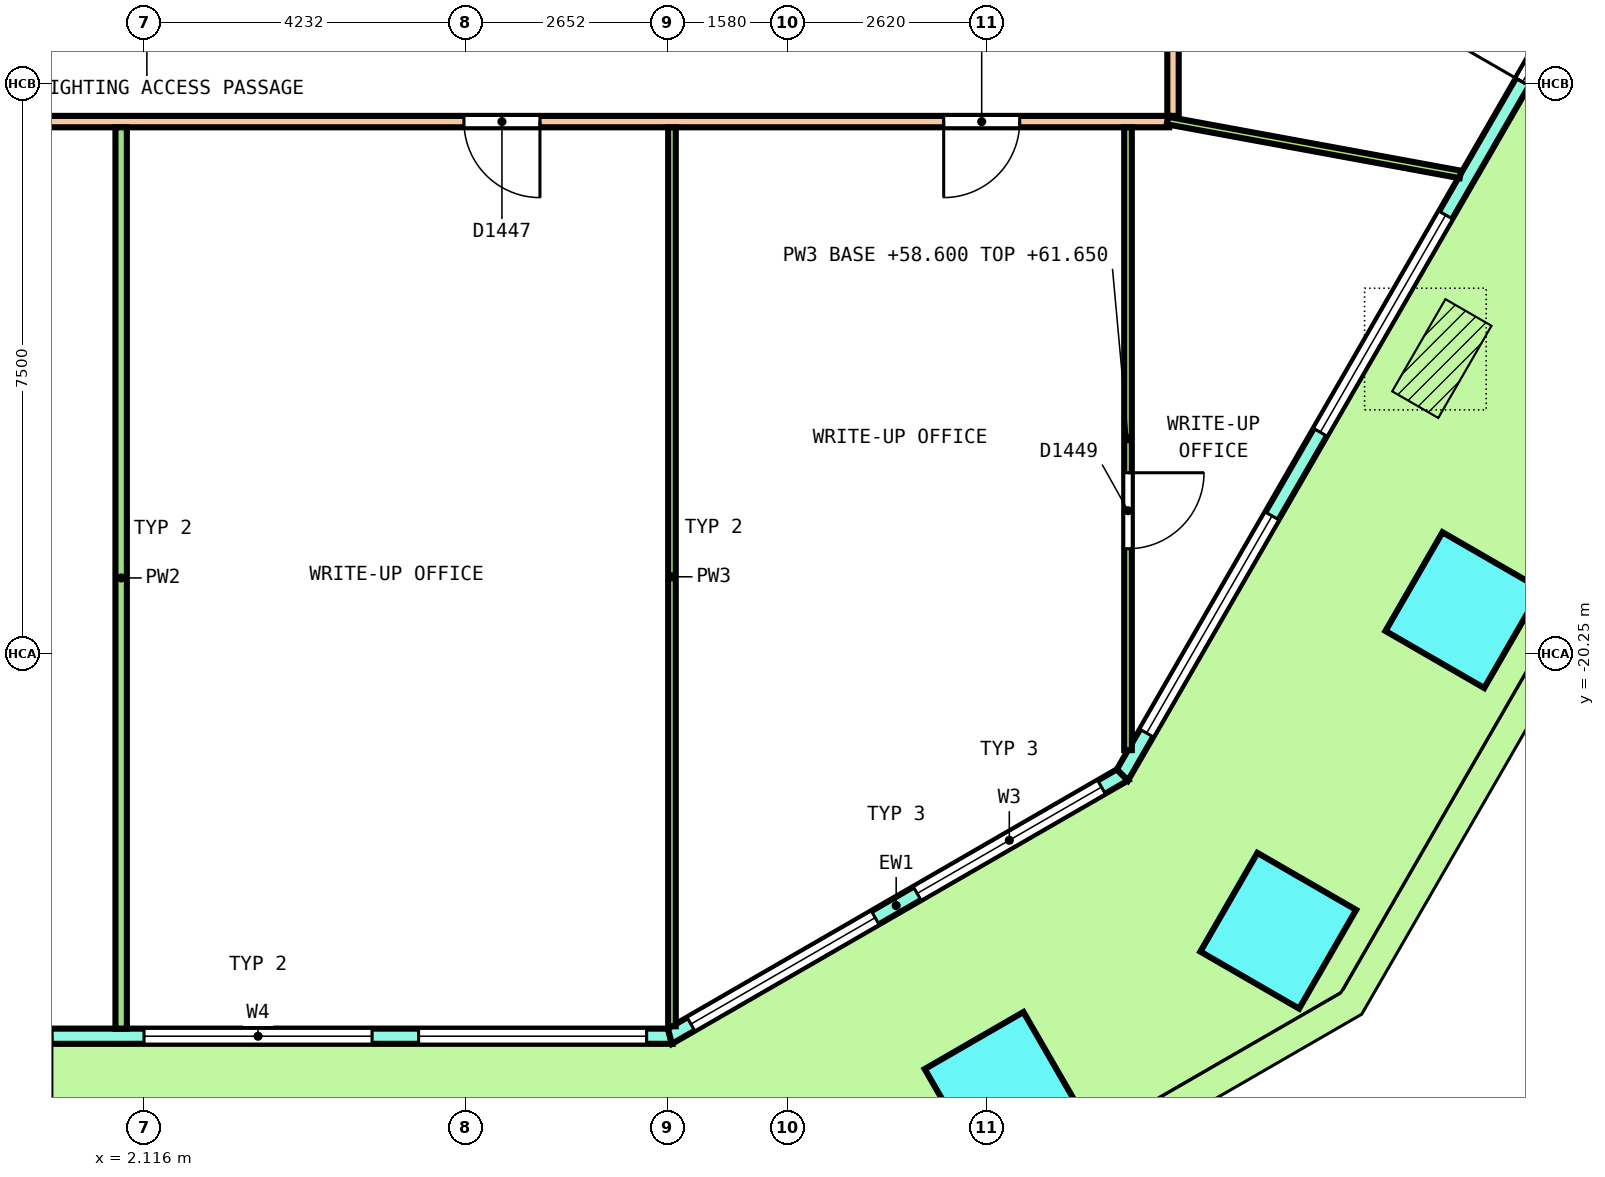
"""IFC4 building model, lengths in metres.
Left out: names, types, materials, properties, quantities, classifications, styles, units other than length and angle.
Written with IfcOpenShell. Run it as: python <this file> out.ifc"""

import sys

from ifc_helpers import new_model, si_unit, direction, frame, frame_2d, origin, origin_2d, place, context, subcontext, project, spatial, polyline, rectangle, outline, extrude, element, fill, save


model = new_model("IFC4")
c1 = context("Model", 3, precision=1e-05, world=origin(), true_north=direction((0.0, 1.0)))
c2 = subcontext(c1, "Body", "Model", "MODEL_VIEW")
j1 = project(units=[si_unit("LENGTHUNIT", "METRE"), si_unit("PLANEANGLEUNIT", "RADIAN")], contexts=[c1])
p1 = place(None, origin())
s1 = spatial("IfcSite", under=j1, at=p1, CompositionType="ELEMENT")
p2 = place(p1, origin())
s2 = spatial("IfcBuilding", under=s1, at=p2, CompositionType="ELEMENT")
p3 = place(p2, frame((0.0, 0.0, 58.6)))
s3 = spatial("IfcBuildingStorey", under=s2, at=p3, CompositionType="ELEMENT", Elevation=58.6)
for number, where, z_axis, x_axis in (
    (1, (13.408, -25.989, 0.0), (0.0, 0.0, 1.0), (0.866, 0.5, 0.0)),
    (2, (17.035, -23.895, 0.0), (0.0, 0.0, 1.0), (0.5, 0.866, 0.0)),
    (3, (19.47, -19.677, 0.0), (0.0, 0.0, 1.0), (0.5, 0.866, 0.0)),
):
    element("IfcColumn", number, at=place(p3, frame(where, z_axis=z_axis, x_axis=x_axis)), inside=s3, PredefinedType="COLUMN", context=c2, shape_type="SweptSolid", body=[
        extrude(rectangle(XDim=1.5, YDim=1.5, at=origin_2d()), origin(), (0.0, 0.0, 1.0), 4.05),
    ])
p4 = place(p3, frame((-9.031, -25.283, 0.0), z_axis=(0.0, 0.0, 1.0), x_axis=(1.0, 0.0, 0.0)))
e4 = element("IfcWall", 4, at=p4, inside=s3, PredefinedType="SOLIDWALL", context=c2, shape_type="SweptSolid", body=[
    extrude(outline(polyline([(-0.027, -0.1), (0.979, -0.1), (1.986, -0.1), (2.992, -0.1), (3.999, -0.1), (5.005, -0.1), (6.012, -0.1), (7.018, -0.1), (8.025, -0.1), (9.031, -0.1), (10.038, -0.1), (11.044, -0.1), (12.051, -0.1), (13.057, -0.1), (14.063, -0.1), (15.07, -0.1), (16.076, -0.1), (17.083, -0.1), (18.089, -0.1), (18.036, 0.1), (17.035, 0.1), (16.035, 0.1), (15.034, 0.1), (14.034, 0.1), (13.033, 0.1), (12.033, 0.1), (11.032, 0.1), (10.032, 0.1), (9.031, 0.1), (8.031, 0.1), (7.03, 0.1), (6.03, 0.1), (5.029, 0.1), (4.029, 0.1), (3.028, 0.1), (2.028, 0.1), (1.027, 0.1), (0.027, 0.1), (-0.027, -0.1)])), origin(), (0.0, 0.0, 1.0), 4.1),
])
p5 = place(p4, frame((0.306, 0.0, 0.1)))
e5 = element("IfcOpeningElement", 5, at=p5, cuts=e4, PredefinedType="OPENING", context=c2, shape_type="SweptSolid", body=[
    extrude(rectangle(XDim=3.0, YDim=2.9, at=frame_2d((1.5, 1.45))), frame((0.0, 0.11, 0.0), z_axis=(0.0, -1.0, 0.0), x_axis=(1.0, 0.0, 0.0)), (0.0, 0.0, 1.0), 0.22),
])
p6 = place(p4, frame((3.919, 0.0, 0.1)))
e6 = element("IfcOpeningElement", 6, at=p6, cuts=e4, PredefinedType="OPENING", context=c2, shape_type="SweptSolid", body=[
    extrude(rectangle(XDim=3.0, YDim=2.9, at=frame_2d((1.5, 1.45))), frame((0.0, 0.11, 0.0), z_axis=(0.0, -1.0, 0.0), x_axis=(1.0, 0.0, 0.0)), (0.0, 0.0, 1.0), 0.22),
])
p7 = place(p4, frame((8.131, 0.0, 0.0)))
e7 = element("IfcOpeningElement", 7, at=p7, cuts=e4, PredefinedType="OPENING", context=c2, shape_type="SweptSolid", body=[
    extrude(rectangle(XDim=1.8, YDim=2.4, at=frame_2d((0.9, 1.2))), frame((0.0, 0.11, 0.0), z_axis=(0.0, -1.0, 0.0), x_axis=(1.0, 0.0, 0.0)), (0.0, 0.0, 1.0), 0.22),
])
p8 = place(p4, frame((8.131, 0.0, 2.55)))
e8 = element("IfcOpeningElement", 8, at=p8, cuts=e4, PredefinedType="OPENING", context=c2, shape_type="SweptSolid", body=[
    extrude(rectangle(XDim=1.8, YDim=0.45, at=frame_2d((0.9, 0.225))), frame((0.0, 0.11, 0.0), z_axis=(0.0, -1.0, 0.0), x_axis=(1.0, 0.0, 0.0)), (0.0, 0.0, 1.0), 0.22),
])
p9 = place(p4, frame((11.144, 0.0, 0.1)))
e9 = element("IfcOpeningElement", 9, at=p9, cuts=e4, PredefinedType="OPENING", context=c2, shape_type="SweptSolid", body=[
    extrude(rectangle(XDim=3.0, YDim=2.9, at=frame_2d((1.5, 1.45))), frame((0.0, 0.11, 0.0), z_axis=(0.0, -1.0, 0.0), x_axis=(1.0, 0.0, 0.0)), (0.0, 0.0, 1.0), 0.22),
])
p10 = place(p4, frame((14.756, 0.0, 0.1)))
e10 = element("IfcOpeningElement", 10, at=p10, cuts=e4, PredefinedType="OPENING", context=c2, shape_type="SweptSolid", body=[
    extrude(rectangle(XDim=3.0, YDim=2.9, at=frame_2d((1.5, 1.45))), frame((0.0, 0.11, 0.0), z_axis=(0.0, -1.0, 0.0), x_axis=(1.0, 0.0, 0.0)), (0.0, 0.0, 1.0), 0.22),
])
p11 = place(p3, frame((9.031, -25.283, 0.0), z_axis=(0.0, 0.0, 1.0), x_axis=(0.866029458321, 0.49999297727, 0.0)))
e11 = element("IfcWall", 11, at=p11, inside=s3, PredefinedType="SOLIDWALL", context=c2, shape_type="SweptSolid", body=[
    extrude(outline(polyline([(-0.027, -0.1), (1.128, -0.1), (2.282, -0.1), (3.437, -0.1), (4.592, -0.1), (5.747, -0.1), (6.901, -0.1), (6.848, 0.1), (5.711, 0.1), (4.574, 0.1), (3.437, 0.1), (2.301, 0.1), (1.164, 0.1), (0.027, 0.1), (-0.027, -0.1)])), origin(), (0.0, 0.0, 1.0), 4.1),
])
p12 = place(p11, frame((0.319, 0.0, 0.1)))
e12 = element("IfcOpeningElement", 12, at=p12, cuts=e11, PredefinedType="OPENING", context=c2, shape_type="SweptSolid", body=[
    extrude(rectangle(XDim=2.8, YDim=2.9, at=frame_2d((1.4, 1.45))), frame((0.0, 0.11, 0.0), z_axis=(0.0, -1.0, 0.0), x_axis=(1.0, 0.0, 0.0)), (0.0, 0.0, 1.0), 0.22),
])
p13 = place(p11, frame((3.756, 0.0, 0.1)))
e13 = element("IfcOpeningElement", 13, at=p13, cuts=e11, PredefinedType="OPENING", context=c2, shape_type="SweptSolid", body=[
    extrude(rectangle(XDim=2.8, YDim=2.9, at=frame_2d((1.4, 1.45))), frame((0.0, 0.11, 0.0), z_axis=(0.0, -1.0, 0.0), x_axis=(1.0, 0.0, 0.0)), (0.0, 0.0, 1.0), 0.22),
])
p14 = place(p3, frame((14.985, -21.845, 0.0), z_axis=(0.0, 0.0, 1.0), x_axis=(0.50000204422, 0.86602422355, 0.0)))
e14 = element("IfcWall", 14, at=p14, inside=s3, PredefinedType="SOLIDWALL", context=c2, shape_type="SweptSolid", body=[
    extrude(outline(polyline([(-0.027, -0.1), (1.014, -0.1), (2.055, -0.1), (3.097, -0.1), (4.138, -0.1), (5.179, -0.1), (6.22, -0.1), (7.261, -0.1), (8.303, -0.1), (9.344, -0.1), (10.385, -0.1), (11.426, -0.1), (12.468, -0.1), (13.509, -0.1), (14.55, -0.1), (15.591, -0.1), (16.632, -0.1), (17.673, -0.1), (18.715, -0.1), (19.756, -0.1), (20.797, -0.1), (21.838, -0.1), (22.879, -0.1), (22.826, 0.1), (21.789, 0.1), (20.753, 0.1), (19.717, 0.1), (18.68, 0.1), (17.644, 0.1), (16.608, 0.1), (15.572, 0.1), (14.535, 0.1), (13.499, 0.1), (12.463, 0.1), (11.426, 0.1), (10.39, 0.1), (9.354, 0.1), (8.317, 0.1), (7.281, 0.1), (6.245, 0.1), (5.208, 0.1), (4.172, 0.1), (3.136, 0.1), (2.099, 0.1), (1.063, 0.1), (0.027, 0.1), (-0.027, -0.1)])), origin(), (0.0, 0.0, 1.0), 4.1),
])
p15 = place(p14, frame((0.635, 0.0, 0.1)))
e15 = element("IfcOpeningElement", 15, at=p15, cuts=e14, PredefinedType="OPENING", context=c2, shape_type="SweptSolid", body=[
    extrude(rectangle(XDim=3.3, YDim=2.9, at=frame_2d((1.65, 1.45))), frame((0.0, 0.11, 0.0), z_axis=(0.0, -1.0, 0.0), x_axis=(1.0, 0.0, 0.0)), (0.0, 0.0, 1.0), 0.22),
])
p16 = place(p14, frame((5.206, 0.0, 0.1)))
e16 = element("IfcOpeningElement", 16, at=p16, cuts=e14, PredefinedType="OPENING", context=c2, shape_type="SweptSolid", body=[
    extrude(rectangle(XDim=3.3, YDim=2.9, at=frame_2d((1.65, 1.45))), frame((0.0, 0.11, 0.0), z_axis=(0.0, -1.0, 0.0), x_axis=(1.0, 0.0, 0.0)), (0.0, 0.0, 1.0), 0.22),
])
p17 = place(p14, frame((10.526, 0.0, 0.0)))
e17 = element("IfcOpeningElement", 17, at=p17, cuts=e14, PredefinedType="OPENING", context=c2, shape_type="SweptSolid", body=[
    extrude(rectangle(XDim=1.8, YDim=2.4, at=frame_2d((0.9, 1.2))), frame((0.0, 0.11, 0.0), z_axis=(0.0, -1.0, 0.0), x_axis=(1.0, 0.0, 0.0)), (0.0, 0.0, 1.0), 0.22),
])
p18 = place(p14, frame((10.526, 0.0, 2.55)))
e18 = element("IfcOpeningElement", 18, at=p18, cuts=e14, PredefinedType="OPENING", context=c2, shape_type="SweptSolid", body=[
    extrude(rectangle(XDim=1.8, YDim=0.45, at=frame_2d((0.9, 0.225))), frame((0.0, 0.11, 0.0), z_axis=(0.0, -1.0, 0.0), x_axis=(1.0, 0.0, 0.0)), (0.0, 0.0, 1.0), 0.22),
])
p19 = place(p14, frame((14.347, 0.0, 0.1)))
e19 = element("IfcOpeningElement", 19, at=p19, cuts=e14, PredefinedType="OPENING", context=c2, shape_type="SweptSolid", body=[
    extrude(rectangle(XDim=3.3, YDim=2.9, at=frame_2d((1.65, 1.45))), frame((0.0, 0.11, 0.0), z_axis=(0.0, -1.0, 0.0), x_axis=(1.0, 0.0, 0.0)), (0.0, 0.0, 1.0), 0.22),
])
p20 = place(p14, frame((18.917, 0.0, 0.1)))
e20 = element("IfcOpeningElement", 20, at=p20, cuts=e14, PredefinedType="OPENING", context=c2, shape_type="SweptSolid", body=[
    extrude(rectangle(XDim=3.3, YDim=2.9, at=frame_2d((1.65, 1.45))), frame((0.0, 0.11, 0.0), z_axis=(0.0, -1.0, 0.0), x_axis=(1.0, 0.0, 0.0)), (0.0, 0.0, 1.0), 0.22),
])
p21 = place(p3, frame((15.65, -13.175, 0.0), z_axis=(0.0, 0.0, 1.0), x_axis=(0.0, 1.0, 0.0)))
e21 = element("IfcWall", 21, at=p21, inside=s3, PredefinedType="PARTITIONING", context=c2, shape_type="SweptSolid", body=[
    extrude(rectangle(XDim=26.35, YDim=0.15, at=frame_2d((13.175, 0.0))), origin(), (0.0, 0.0, 1.0), 3.05),
])
p22 = place(p21, frame((16.576, 0.0, 0.0)))
e22 = element("IfcOpeningElement", 22, at=p22, cuts=e21, PredefinedType="OPENING", context=c2, shape_type="SweptSolid", body=[
    extrude(rectangle(XDim=1.2, YDim=2.1, at=frame_2d((0.6, 1.05))), frame((0.0, 0.085, 0.0), z_axis=(0.0, -1.0, 0.0), x_axis=(1.0, 0.0, 0.0)), (0.0, 0.0, 1.0), 0.17),
])
p23 = place(p21, frame((22.401, 0.0, 0.0)))
e23 = element("IfcOpeningElement", 23, at=p23, cuts=e21, PredefinedType="OPENING", context=c2, shape_type="SweptSolid", body=[
    extrude(rectangle(XDim=1.0, YDim=2.1, at=frame_2d((0.5, 1.05))), frame((0.0, 0.085, 0.0), z_axis=(0.0, -1.0, 0.0), x_axis=(1.0, 0.0, 0.0)), (0.0, 0.0, 1.0), 0.17),
])
p24 = place(p21, frame((1.65, 0.0, 0.0)))
e24 = element("IfcOpeningElement", 24, at=p24, cuts=e21, PredefinedType="OPENING", context=c2, shape_type="SweptSolid", body=[
    extrude(rectangle(XDim=1.0, YDim=2.1, at=frame_2d((0.5, 1.05))), frame((0.0, 0.085, 0.0), z_axis=(0.0, -1.0, 0.0), x_axis=(1.0, 0.0, 0.0)), (0.0, 0.0, 1.0), 0.17),
])
p25 = place(p3, frame((-15.725, -13.25, 0.0), z_axis=(0.0, 0.0, 1.0), x_axis=(1.0, 0.0, 0.0)))
e25 = element("IfcWall", 25, at=p25, inside=s3, PredefinedType="PARTITIONING", context=c2, shape_type="SweptSolid", body=[
    extrude(rectangle(XDim=31.325, YDim=0.15, at=frame_2d((15.663, 0.0))), origin(), (0.0, 0.0, 1.0), 3.05),
])
p26 = place(p25, frame((0.898, 0.0, 0.0)))
e26 = element("IfcOpeningElement", 26, at=p26, cuts=e25, PredefinedType="OPENING", context=c2, shape_type="SweptSolid", body=[
    extrude(rectangle(XDim=1.0, YDim=2.1, at=frame_2d((0.5, 1.05))), frame((0.0, 0.085, 0.0), z_axis=(0.0, -1.0, 0.0), x_axis=(1.0, 0.0, 0.0)), (0.0, 0.0, 1.0), 0.17),
])
p27 = place(p25, frame((5.198, 0.0, 0.0)))
e27 = element("IfcOpeningElement", 27, at=p27, cuts=e25, PredefinedType="OPENING", context=c2, shape_type="SweptSolid", body=[
    extrude(rectangle(XDim=1.2, YDim=2.1, at=frame_2d((0.6, 1.05))), frame((0.0, 0.085, 0.0), z_axis=(0.0, -1.0, 0.0), x_axis=(1.0, 0.0, 0.0)), (0.0, 0.0, 1.0), 0.17),
])
p28 = place(p25, frame((14.115, 0.0, 0.0)))
e28 = element("IfcOpeningElement", 28, at=p28, cuts=e25, PredefinedType="OPENING", context=c2, shape_type="SweptSolid", body=[
    extrude(rectangle(XDim=1.2, YDim=2.1, at=frame_2d((0.6, 1.05))), frame((0.0, 0.085, 0.0), z_axis=(0.0, -1.0, 0.0), x_axis=(1.0, 0.0, 0.0)), (0.0, 0.0, 1.0), 0.17),
])
p29 = place(p25, frame((22.046, 0.0, 0.0)))
e29 = element("IfcOpeningElement", 29, at=p29, cuts=e25, PredefinedType="OPENING", context=c2, shape_type="SweptSolid", body=[
    extrude(rectangle(XDim=1.0, YDim=2.1, at=frame_2d((0.5, 1.05))), frame((0.0, 0.085, 0.0), z_axis=(0.0, -1.0, 0.0), x_axis=(1.0, 0.0, 0.0)), (0.0, 0.0, 1.0), 0.17),
])
p30 = place(p25, frame((28.358, 0.0, 0.0)))
e30 = element("IfcOpeningElement", 30, at=p30, cuts=e25, PredefinedType="OPENING", context=c2, shape_type="SweptSolid", body=[
    extrude(rectangle(XDim=1.0, YDim=2.1, at=frame_2d((0.5, 1.05))), frame((0.0, 0.085, 0.0), z_axis=(0.0, -1.0, 0.0), x_axis=(1.0, 0.0, 0.0)), (0.0, 0.0, 1.0), 0.17),
])
p31 = place(p3, frame((1.812, -25.183, 0.0), z_axis=(0.0, 0.0, 1.0), x_axis=(0.0, 1.0, 0.0)))
e31 = element("IfcWall", 31, at=p31, inside=s3, PredefinedType="PARTITIONING", context=c2, shape_type="SweptSolid", body=[
    extrude(rectangle(XDim=11.858, YDim=0.15, at=frame_2d((5.929, 0.0))), origin(), (0.0, 0.0, 1.0), 3.05),
])
p32 = place(p3, frame((9.058, -25.152, 0.0), z_axis=(0.0, 0.0, 1.0), x_axis=(0.0, 1.0, 0.0)))
e32 = element("IfcWall", 32, at=p32, inside=s3, PredefinedType="PARTITIONING", context=c2, shape_type="SweptSolid", body=[
    extrude(rectangle(XDim=11.827, YDim=0.1, at=frame_2d((5.914, 0.0))), origin(), (0.0, 0.0, 1.0), 3.05),
])
p33 = place(p3, frame((15.058, -21.519, 0.0), z_axis=(0.0, 0.0, 1.0), x_axis=(0.0, 1.0, 0.0)))
e33 = element("IfcWall", 33, at=p33, inside=s3, PredefinedType="PARTITIONING", context=c2, shape_type="SweptSolid", body=[
    extrude(rectangle(XDim=8.194, YDim=0.1, at=frame_2d((4.097, 0.0))), origin(), (0.0, 0.0, 1.0), 3.05),
])
p34 = place(p33, frame((2.649, 0.0, 0.0)))
e34 = element("IfcOpeningElement", 34, at=p34, cuts=e33, PredefinedType="OPENING", context=c2, shape_type="SweptSolid", body=[
    extrude(rectangle(XDim=1.0, YDim=2.1, at=frame_2d((0.5, 1.05))), frame((0.0, 0.06, 0.0), z_axis=(0.0, -1.0, 0.0), x_axis=(1.0, 0.0, 0.0)), (0.0, 0.0, 1.0), 0.12),
])
p35 = place(p3, frame((15.576, -13.236, 0.0), z_axis=(0.0, 0.0, 1.0), x_axis=(0.983499014775, -0.18091348191, 0.0)))
e35 = element("IfcWall", 35, at=p35, inside=s3, PredefinedType="PARTITIONING", context=c2, shape_type="SweptSolid", body=[
    extrude(rectangle(XDim=3.919, YDim=0.1, at=frame_2d((1.959, 0.0))), origin(), (0.0, 0.0, 1.0), 3.05),
])
p36 = place(p9, origin())
e36 = element("IfcWindow", 36, at=p36, inside=s3, PartitioningType="SINGLE_PANEL", PredefinedType="WINDOW", context=c2, shape_type="SweptSolid", body=[
    extrude(rectangle(XDim=3.0, YDim=2.9, at=frame_2d((1.5, 1.45))), frame((0.0, 0.03, 0.0), z_axis=(0.0, -1.0, 0.0), x_axis=(1.0, 0.0, 0.0)), (0.0, 0.0, 1.0), 0.06),
])
fill(e9, e36)
p37 = place(p10, origin())
e37 = element("IfcWindow", 37, at=p37, inside=s3, PartitioningType="SINGLE_PANEL", PredefinedType="WINDOW", context=c2, shape_type="SweptSolid", body=[
    extrude(rectangle(XDim=3.0, YDim=2.9, at=frame_2d((1.5, 1.45))), frame((0.0, 0.03, 0.0), z_axis=(0.0, -1.0, 0.0), x_axis=(1.0, 0.0, 0.0)), (0.0, 0.0, 1.0), 0.06),
])
fill(e10, e37)
p38 = place(p12, origin())
e38 = element("IfcWindow", 38, at=p38, inside=s3, PartitioningType="SINGLE_PANEL", PredefinedType="WINDOW", context=c2, shape_type="SweptSolid", body=[
    extrude(rectangle(XDim=2.8, YDim=2.9, at=frame_2d((1.4, 1.45))), frame((0.0, 0.03, 0.0), z_axis=(0.0, -1.0, 0.0), x_axis=(1.0, 0.0, 0.0)), (0.0, 0.0, 1.0), 0.06),
])
fill(e12, e38)
p39 = place(p13, origin())
e39 = element("IfcWindow", 39, at=p39, inside=s3, PartitioningType="SINGLE_PANEL", PredefinedType="WINDOW", context=c2, shape_type="SweptSolid", body=[
    extrude(rectangle(XDim=2.8, YDim=2.9, at=frame_2d((1.4, 1.45))), frame((0.0, 0.03, 0.0), z_axis=(0.0, -1.0, 0.0), x_axis=(1.0, 0.0, 0.0)), (0.0, 0.0, 1.0), 0.06),
])
fill(e13, e39)
p40 = place(p15, origin())
e40 = element("IfcWindow", 40, at=p40, inside=s3, PartitioningType="SINGLE_PANEL", PredefinedType="WINDOW", context=c2, shape_type="SweptSolid", body=[
    extrude(rectangle(XDim=3.3, YDim=2.9, at=frame_2d((1.65, 1.45))), frame((0.0, 0.03, 0.0), z_axis=(0.0, -1.0, 0.0), x_axis=(1.0, 0.0, 0.0)), (0.0, 0.0, 1.0), 0.06),
])
fill(e15, e40)
p41 = place(p16, origin())
e41 = element("IfcWindow", 41, at=p41, inside=s3, PartitioningType="SINGLE_PANEL", PredefinedType="WINDOW", context=c2, shape_type="SweptSolid", body=[
    extrude(rectangle(XDim=3.3, YDim=2.9, at=frame_2d((1.65, 1.45))), frame((0.0, 0.03, 0.0), z_axis=(0.0, -1.0, 0.0), x_axis=(1.0, 0.0, 0.0)), (0.0, 0.0, 1.0), 0.06),
])
fill(e16, e41)
p42 = place(p17, origin())
e42 = element("IfcDoor", 42, at=p42, inside=s3, OperationType="DOUBLE_DOOR_SINGLE_SWING", PredefinedType="DOOR", context=c2, shape_type="SweptSolid", body=[
    extrude(rectangle(XDim=1.8, YDim=2.4, at=frame_2d((0.9, 1.2))), frame((0.0, 0.025, 0.0), z_axis=(0.0, -1.0, 0.0), x_axis=(1.0, 0.0, 0.0)), (0.0, 0.0, 1.0), 0.05),
])
fill(e17, e42)
p43 = place(p18, origin())
e43 = element("IfcWindow", 43, at=p43, inside=s3, PartitioningType="SINGLE_PANEL", PredefinedType="WINDOW", context=c2, shape_type="SweptSolid", body=[
    extrude(rectangle(XDim=1.8, YDim=0.45, at=frame_2d((0.9, 0.225))), frame((0.0, 0.03, 0.0), z_axis=(0.0, -1.0, 0.0), x_axis=(1.0, 0.0, 0.0)), (0.0, 0.0, 1.0), 0.06),
])
fill(e18, e43)
p44 = place(p29, origin())
e44 = element("IfcDoor", 44, at=p44, inside=s3, OperationType="SINGLE_SWING_LEFT", PredefinedType="DOOR", context=c2, shape_type="SweptSolid", body=[
    extrude(rectangle(XDim=1.0, YDim=2.1, at=frame_2d((0.5, 1.05))), frame((0.0, 0.025, 0.0), z_axis=(0.0, -1.0, 0.0), x_axis=(1.0, 0.0, 0.0)), (0.0, 0.0, 1.0), 0.05),
])
fill(e29, e44)
p45 = place(p30, origin())
e45 = element("IfcDoor", 45, at=p45, inside=s3, OperationType="SINGLE_SWING_RIGHT", PredefinedType="DOOR", context=c2, shape_type="SweptSolid", body=[
    extrude(rectangle(XDim=1.0, YDim=2.1, at=frame_2d((0.5, 1.05))), frame((0.0, 0.025, 0.0), z_axis=(0.0, -1.0, 0.0), x_axis=(1.0, 0.0, 0.0)), (0.0, 0.0, 1.0), 0.05),
])
fill(e30, e45)
p46 = place(p34, origin())
e46 = element("IfcDoor", 46, at=p46, inside=s3, OperationType="SINGLE_SWING_RIGHT", PredefinedType="DOOR", context=c2, shape_type="SweptSolid", body=[
    extrude(rectangle(XDim=1.0, YDim=2.1, at=frame_2d((0.5, 1.05))), frame((0.0, 0.025, 0.0), z_axis=(0.0, -1.0, 0.0), x_axis=(1.0, 0.0, 0.0)), (0.0, 0.0, 1.0), 0.05),
])
fill(e34, e46)
save(model, sys.argv[1])
